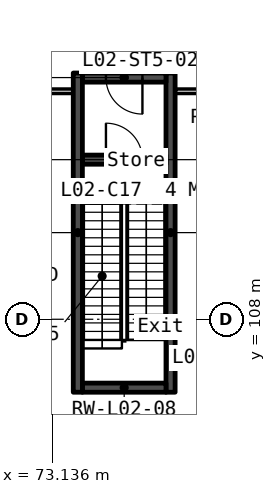
"""IFC4 building model, lengths in metres.
Left out: names, types, materials, properties, quantities, classifications, styles, units other than length and angle.
Written with IfcOpenShell. Run it as: python <this file> out.ifc"""

import sys

from ifc_helpers import new_model, si_unit, direction, frame, frame_2d, origin, place, context, subcontext, project, spatial, rectangle, extrude, element, fill, save


model = new_model("IFC4")
c1 = context("Model", 3, precision=1e-05, world=origin(), true_north=direction((0.0, 1.0)))
c2 = subcontext(c1, "Body", "Model", "MODEL_VIEW")
j1 = project(units=[si_unit("LENGTHUNIT", "METRE"), si_unit("PLANEANGLEUNIT", "RADIAN")], contexts=[c1])
p1 = place(None, origin())
s1 = spatial("IfcSite", under=j1, at=p1, CompositionType="ELEMENT")
p2 = place(p1, origin())
s2 = spatial("IfcBuilding", under=s1, at=p2, CompositionType="ELEMENT")
p3 = place(p2, frame((0.0, 0.0, 13.5)))
s3 = spatial("IfcBuildingStorey", under=s2, at=p3, CompositionType="ELEMENT", Elevation=13.5)
for number, where, z_axis, x_axis in (
    (1, (73.975, 105.6, 0.0), (0.0, 0.0, 1.0), (0.0, 1.0, 0.0)),
    (2, (77.025, 105.6, 0.0), (0.0, 0.0, 1.0), (0.0, 1.0, 0.0)),
):
    element("IfcWall", number, at=place(p3, frame(where, z_axis=z_axis, x_axis=x_axis)), inside=s3, PredefinedType="SOLIDWALL", context=c2, shape_type="SweptSolid", body=[
        extrude(rectangle(XDim=10.5, YDim=0.3, at=frame_2d((5.25, 0.0))), origin(), (0.0, 0.0, 1.0), 5.75),
    ])
p4 = place(p3, frame((74.125, 105.75, 0.0), z_axis=(0.0, 0.0, 1.0), x_axis=(1.0, 0.0, 0.0)))
e3 = element("IfcWall", 3, at=p4, inside=s3, PredefinedType="SOLIDWALL", context=c2, shape_type="SweptSolid", body=[
    extrude(rectangle(XDim=2.75, YDim=0.3, at=frame_2d((1.375, 0.0))), origin(), (0.0, 0.0, 1.0), 5.75),
])
p5 = place(p3, frame((74.125, 113.25, 0.0), z_axis=(0.0, 0.0, 1.0), x_axis=(1.0, 0.0, 0.0)))
e4 = element("IfcWall", 4, at=p5, inside=s3, PredefinedType="SOLIDWALL", context=c2, shape_type="SweptSolid", body=[
    extrude(rectangle(XDim=2.75, YDim=0.3, at=frame_2d((1.375, 0.0))), origin(), (0.0, 0.0, 1.0), 5.75),
])
p6 = place(p5, frame((0.775, 0.0, 0.0)))
e5 = element("IfcOpeningElement", 5, at=p6, cuts=e4, PredefinedType="OPENING", context=c2, shape_type="SweptSolid", body=[
    extrude(rectangle(XDim=1.2, YDim=2.1, at=frame_2d((0.6, 1.05))), frame((0.0, 0.16, 0.0), z_axis=(0.0, -1.0, 0.0), x_axis=(1.0, 0.0, 0.0)), (0.0, 0.0, 1.0), 0.32),
])
p7 = place(p3, frame((74.125, 115.95, 0.0), z_axis=(0.0, 0.0, 1.0), x_axis=(1.0, 0.0, 0.0)))
e6 = element("IfcWall", 6, at=p7, inside=s3, PredefinedType="SOLIDWALL", context=c2, shape_type="SweptSolid", body=[
    extrude(rectangle(XDim=2.75, YDim=0.3, at=frame_2d((1.375, 0.0))), origin(), (0.0, 0.0, 1.0), 5.75),
])
p8 = place(p7, frame((0.775, 0.0, 0.0)))
e7 = element("IfcOpeningElement", 7, at=p8, cuts=e6, PredefinedType="OPENING", context=c2, shape_type="SweptSolid", body=[
    extrude(rectangle(XDim=1.2, YDim=2.1, at=frame_2d((0.6, 1.05))), frame((0.0, 0.16, 0.0), z_axis=(0.0, -1.0, 0.0), x_axis=(1.0, 0.0, 0.0)), (0.0, 0.0, 1.0), 0.32),
])
p9 = place(p3, frame((77.166, 41.679, 0.0), z_axis=(0.0, 0.0, 1.0), x_axis=(-0.500000924498, 0.866024870025, 0.0)))
e8 = element("IfcWall", 8, at=p9, inside=s3, PredefinedType="STANDARD", context=c2, shape_type="SweptSolid", body=[
    extrude(rectangle(XDim=100.935, YDim=1.0, at=frame_2d((50.467, 0.0))), origin(), (0.0, 0.0, 1.0), 0.6),
])
p10 = place(p3, frame((45.01, 115.5, 0.0), z_axis=(0.0, 0.0, 1.0), x_axis=(1.0, 0.0, 0.0)))
e9 = element("IfcWall", 9, at=p10, inside=s3, PredefinedType="PARTITIONING", context=c2, shape_type="SweptSolid", body=[
    extrude(rectangle(XDim=28.795, YDim=0.15, at=frame_2d((14.397, 0.0))), origin(), (0.0, 0.0, 1.0), 5.75),
])
p11 = place(p3, frame((77.195, 115.5, 0.0), z_axis=(0.0, 0.0, 1.0), x_axis=(1.0, 0.0, 0.0)))
e10 = element("IfcWall", 10, at=p11, inside=s3, PredefinedType="PARTITIONING", context=c2, shape_type="SweptSolid", body=[
    extrude(rectangle(XDim=37.925, YDim=0.15, at=frame_2d((18.962, 0.0))), origin(), (0.0, 0.0, 1.0), 5.75),
])
p12 = place(p6, origin())
e11 = element("IfcDoor", 11, at=p12, inside=s3, OperationType="SINGLE_SWING_LEFT", PredefinedType="DOOR", context=c2, shape_type="SweptSolid", body=[
    extrude(rectangle(XDim=1.2, YDim=2.1, at=frame_2d((0.6, 1.05))), frame((0.0, 0.025, 0.0), z_axis=(0.0, -1.0, 0.0), x_axis=(1.0, 0.0, 0.0)), (0.0, 0.0, 1.0), 0.05),
])
fill(e5, e11)
p13 = place(p8, origin())
e12 = element("IfcDoor", 12, at=p13, inside=s3, OperationType="SINGLE_SWING_RIGHT", PredefinedType="DOOR", context=c2, shape_type="SweptSolid", body=[
    extrude(rectangle(XDim=1.2, YDim=2.1, at=frame_2d((0.6, 1.05))), frame((0.0, 0.025, 0.0), z_axis=(0.0, -1.0, 0.0), x_axis=(1.0, 0.0, 0.0)), (0.0, 0.0, 1.0), 0.05),
])
fill(e7, e12)
save(model, sys.argv[1])
